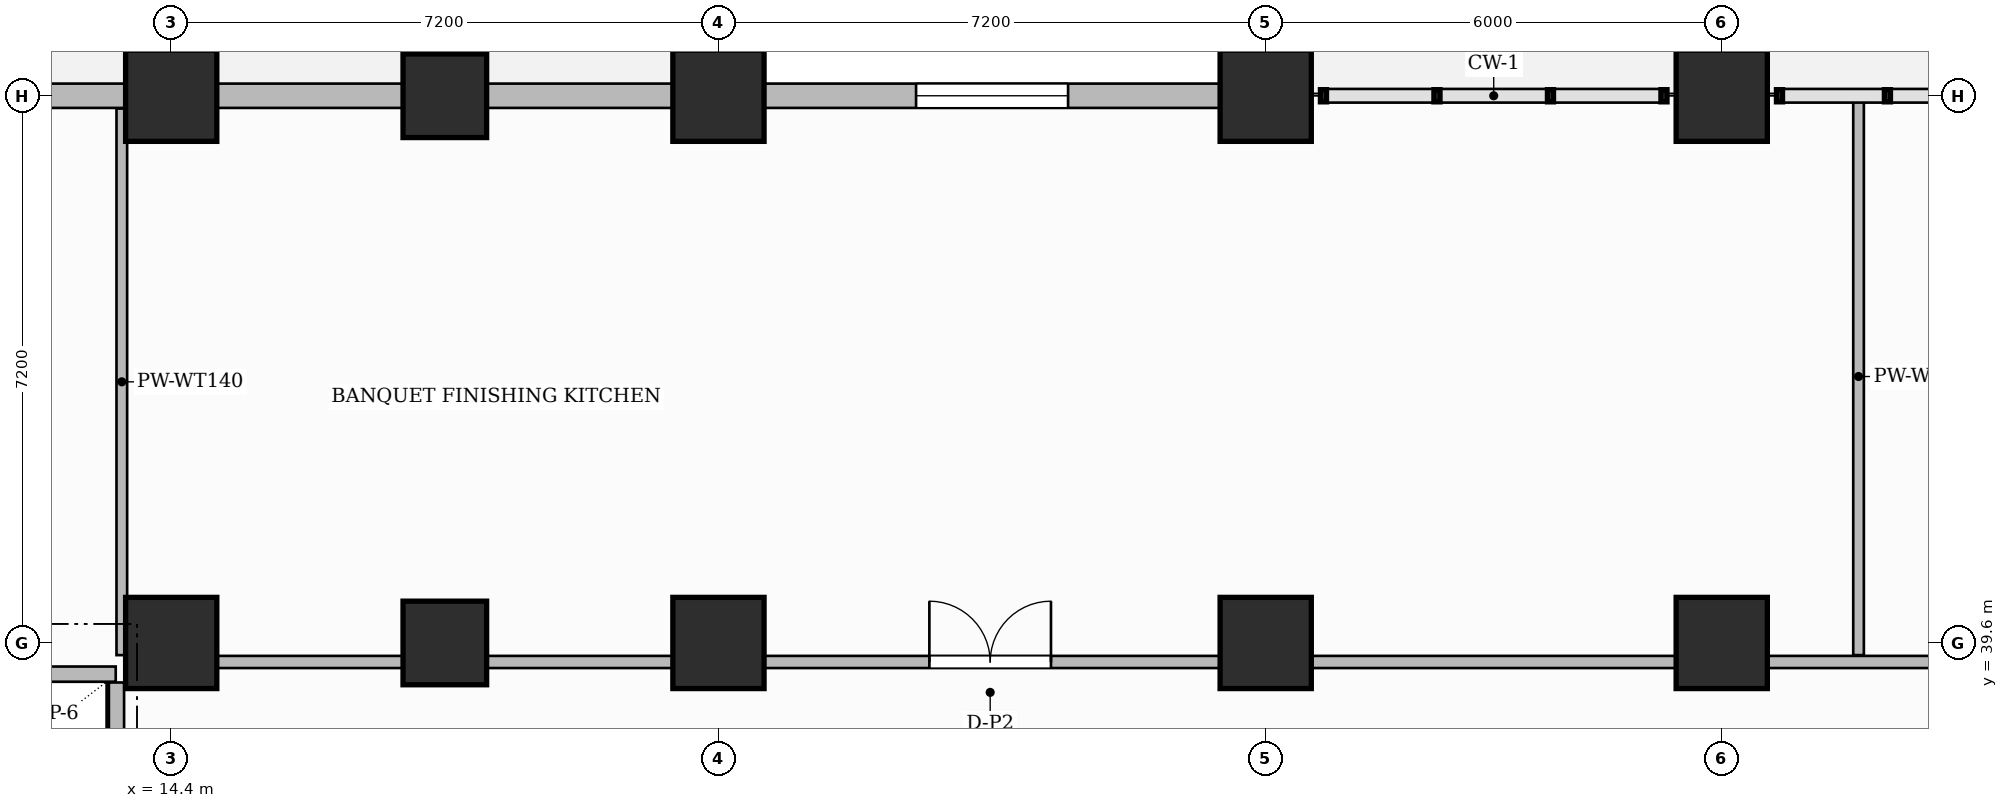
"""IFC4 building model, lengths in metres.
Left out: names, types, materials, properties, quantities, classifications, styles, units other than length and angle.
Written with IfcOpenShell. Run it as: python <this file> out.ifc"""

import sys

from ifc_helpers import new_model, si_unit, direction, frame, frame_2d, origin, origin_2d, place, context, subcontext, project, spatial, rectangle, extrude, source, transform, mapped, element, fill, save


model = new_model("IFC4")
c1 = context("Model", 3, precision=1e-05, world=origin(), true_north=direction((0.0, 1.0)))
c2 = subcontext(c1, "Body", "Model", "MODEL_VIEW")
j1 = project(units=[si_unit("LENGTHUNIT", "METRE"), si_unit("PLANEANGLEUNIT", "RADIAN")], contexts=[c1])
p1 = place(None, origin())
s1 = spatial("IfcSite", under=j1, at=p1, CompositionType="ELEMENT")
p2 = place(p1, origin())
s2 = spatial("IfcBuilding", under=s1, at=p2, CompositionType="ELEMENT")
p3 = place(p2, frame((0.0, 0.0, 16.2)))
s3 = spatial("IfcBuildingStorey", under=s2, at=p3, CompositionType="ELEMENT", Elevation=16.2)
m1 = source(origin(), c2, "Body", "SweptSolid", [
    extrude(rectangle(XDim=1.2, YDim=1.2, at=origin_2d()), origin(), (0.0, 0.0, 1.0), 5.4),
])
for number, where, z_axis, x_axis in (
    (1, (14.4, 39.6, 0.0), (0.0, 0.0, 1.0), (1.0, 0.0, 0.0)),
    (2, (14.4, 46.8, 0.0), (0.0, 0.0, 1.0), (1.0, 0.0, 0.0)),
    (3, (21.6, 39.6, 0.0), (0.0, 0.0, 1.0), (1.0, 0.0, 0.0)),
    (4, (21.6, 46.8, 0.0), (0.0, 0.0, 1.0), (1.0, 0.0, 0.0)),
    (5, (28.8, 39.6, 0.0), (0.0, 0.0, 1.0), (1.0, 0.0, 0.0)),
    (6, (28.8, 46.8, 0.0), (0.0, 0.0, 1.0), (1.0, 0.0, 0.0)),
    (7, (34.8, 39.6, 0.0), (0.0, 0.0, 1.0), (1.0, 0.0, 0.0)),
    (8, (34.8, 46.8, 0.0), (0.0, 0.0, 1.0), (1.0, 0.0, 0.0)),
):
    element("IfcColumn", number, at=place(p3, frame(where, z_axis=z_axis, x_axis=x_axis)), inside=s3, PredefinedType="COLUMN", context=c2, shape_type="MappedRepresentation", body=[
        mapped(m1, transform((0.0, 0.0, 0.0), scale=1.0)),
    ])
m2 = source(origin(), c2, "Body", "SweptSolid", [
    extrude(rectangle(XDim=1.1, YDim=1.1, at=origin_2d()), origin(), (0.0, 0.0, 1.0), 5.4),
])
for number, where, z_axis, x_axis in (
    (9, (18.0, 39.6, 0.0), (0.0, 0.0, 1.0), (1.0, 0.0, 0.0)),
    (10, (18.0, 46.8, 0.0), (0.0, 0.0, 1.0), (1.0, 0.0, 0.0)),
):
    element("IfcColumn", number, at=place(p3, frame(where, z_axis=z_axis, x_axis=x_axis)), inside=s3, PredefinedType="COLUMN", context=c2, shape_type="MappedRepresentation", body=[
        mapped(m2, transform((0.0, 0.0, 0.0), scale=1.0)),
    ])
p4 = place(p3, frame((11.71, 39.19, 0.0), z_axis=(0.0, 0.0, 1.0), x_axis=(1.0, 0.0, 0.0)))
e11 = element("IfcWall", 11, at=p4, inside=s3, PredefinedType="PARTITIONING", context=c2, shape_type="SweptSolid", body=[
    extrude(rectangle(XDim=1.96, YDim=0.2, at=frame_2d((0.98, 0.0))), origin(), (0.0, 0.0, 1.0), 5.1),
])
p5 = place(p3, frame((13.68, 34.36, 0.0), z_axis=(0.0, 0.0, 1.0), x_axis=(0.0, 1.0, 0.0)))
e12 = element("IfcWall", 12, at=p5, inside=s3, PredefinedType="PARTITIONING", context=c2, shape_type="SweptSolid", body=[
    extrude(rectangle(XDim=4.72, YDim=0.2, at=frame_2d((2.36, 0.0))), origin(), (0.0, 0.0, 1.0), 5.1),
])
p6 = place(p3, frame((13.75, 39.44, 0.0), z_axis=(0.0, 0.0, 1.0), x_axis=(0.0, 1.0, 0.0)))
e13 = element("IfcWall", 13, at=p6, inside=s3, PredefinedType="PARTITIONING", context=c2, shape_type="SweptSolid", body=[
    extrude(rectangle(XDim=7.192, YDim=0.14, at=frame_2d((3.596, 0.0))), origin(), (0.0, 0.0, 1.0), 5.1),
])
p7 = place(p3, frame((13.84, 39.35, 0.0), z_axis=(0.0, 0.0, 1.0), x_axis=(1.0, 0.0, 0.0)))
e14 = element("IfcWall", 14, at=p7, inside=s3, PredefinedType="PARTITIONING", context=c2, shape_type="SweptSolid", body=[
    extrude(rectangle(XDim=58.52, YDim=0.16, at=frame_2d((29.26, 0.0))), origin(), (0.0, 0.0, 1.0), 4.185),
])
p8 = place(p7, frame((10.535, 0.0, 0.0)))
e15 = element("IfcOpeningElement", 15, at=p8, cuts=e14, PredefinedType="OPENING", context=c2, shape_type="SweptSolid", body=[
    extrude(rectangle(XDim=1.6, YDim=2.4, at=frame_2d((0.8, 1.2))), frame((0.0, 0.09, 0.0), z_axis=(0.0, -1.0, 0.0), x_axis=(1.0, 0.0, 0.0)), (0.0, 0.0, 1.0), 0.18),
])
p9 = place(p7, frame((30.66, 0.0, 0.0)))
e16 = element("IfcOpeningElement", 16, at=p9, cuts=e14, PredefinedType="OPENING", context=c2, shape_type="SweptSolid", body=[
    extrude(rectangle(XDim=1.6, YDim=2.4, at=frame_2d((0.8, 1.2))), frame((0.0, 0.09, 0.0), z_axis=(0.0, -1.0, 0.0), x_axis=(1.0, 0.0, 0.0)), (0.0, 0.0, 1.0), 0.18),
])
p10 = place(p7, frame((44.235, 0.0, 0.0)))
e17 = element("IfcOpeningElement", 17, at=p10, cuts=e14, PredefinedType="OPENING", context=c2, shape_type="SweptSolid", body=[
    extrude(rectangle(XDim=0.85, YDim=2.1, at=frame_2d((0.425, 1.05))), frame((0.0, 0.09, 0.0), z_axis=(0.0, -1.0, 0.0), x_axis=(1.0, 0.0, 0.0)), (0.0, 0.0, 1.0), 0.18),
])
p11 = place(p7, frame((50.335, 0.0, 0.0)))
e18 = element("IfcOpeningElement", 18, at=p11, cuts=e14, PredefinedType="OPENING", context=c2, shape_type="SweptSolid", body=[
    extrude(rectangle(XDim=0.85, YDim=2.1, at=frame_2d((0.425, 1.05))), frame((0.0, 0.09, 0.0), z_axis=(0.0, -1.0, 0.0), x_axis=(1.0, 0.0, 0.0)), (0.0, 0.0, 1.0), 0.18),
])
p12 = place(p7, frame((54.685, 0.0, 0.0)))
e19 = element("IfcOpeningElement", 19, at=p12, cuts=e14, PredefinedType="OPENING", context=c2, shape_type="SweptSolid", body=[
    extrude(rectangle(XDim=1.6, YDim=2.4, at=frame_2d((0.8, 1.2))), frame((0.0, 0.09, 0.0), z_axis=(0.0, -1.0, 0.0), x_axis=(1.0, 0.0, 0.0)), (0.0, 0.0, 1.0), 0.18),
])
p13 = place(p3, frame((36.6, 39.44, 0.0), z_axis=(0.0, 0.0, 1.0), x_axis=(0.0, 1.0, 0.0)))
e20 = element("IfcWall", 20, at=p13, inside=s3, PredefinedType="PARTITIONING", context=c2, shape_type="SweptSolid", body=[
    extrude(rectangle(XDim=7.332, YDim=0.14, at=frame_2d((3.666, 0.0))), origin(), (0.0, 0.0, 1.0), 5.1),
])
p14 = place(p3, frame((-4.8, 46.8, 0.0), z_axis=(0.0, 0.0, 1.0), x_axis=(1.0, 0.0, 0.0)))
e21 = element("IfcWall", 21, at=p14, inside=s3, PredefinedType="SOLIDWALL", context=c2, shape_type="SweptSolid", body=[
    extrude(rectangle(XDim=33.6, YDim=0.32, at=frame_2d((16.8, 0.0))), origin(), (0.0, 0.0, 1.0), 4.185),
])
p15 = place(p14, frame((1.4, 0.0, 0.75)))
e22 = element("IfcOpeningElement", 22, at=p15, cuts=e21, PredefinedType="OPENING", context=c2, shape_type="SweptSolid", body=[
    extrude(rectangle(XDim=2.0, YDim=2.6, at=frame_2d((1.0, 1.3))), frame((0.0, 0.17, 0.0), z_axis=(0.0, -1.0, 0.0), x_axis=(1.0, 0.0, 0.0)), (0.0, 0.0, 1.0), 0.34),
])
p16 = place(p14, frame((7.4, 0.0, 0.75)))
e23 = element("IfcOpeningElement", 23, at=p16, cuts=e21, PredefinedType="OPENING", context=c2, shape_type="SweptSolid", body=[
    extrude(rectangle(XDim=2.0, YDim=2.6, at=frame_2d((1.0, 1.3))), frame((0.0, 0.17, 0.0), z_axis=(0.0, -1.0, 0.0), x_axis=(1.0, 0.0, 0.0)), (0.0, 0.0, 1.0), 0.34),
])
p17 = place(p14, frame((14.6, 0.0, 0.75)))
e24 = element("IfcOpeningElement", 24, at=p17, cuts=e21, PredefinedType="OPENING", context=c2, shape_type="SweptSolid", body=[
    extrude(rectangle(XDim=2.0, YDim=2.6, at=frame_2d((1.0, 1.3))), frame((0.0, 0.17, 0.0), z_axis=(0.0, -1.0, 0.0), x_axis=(1.0, 0.0, 0.0)), (0.0, 0.0, 1.0), 0.34),
])
p18 = place(p14, frame((29.0, 0.0, 0.75)))
e25 = element("IfcOpeningElement", 25, at=p18, cuts=e21, PredefinedType="OPENING", context=c2, shape_type="SweptSolid", body=[
    extrude(rectangle(XDim=2.0, YDim=2.6, at=frame_2d((1.0, 1.3))), frame((0.0, 0.17, 0.0), z_axis=(0.0, -1.0, 0.0), x_axis=(1.0, 0.0, 0.0)), (0.0, 0.0, 1.0), 0.34),
])
m3 = source(origin(), c2, "Body", "SweptSolid", [
    extrude(rectangle(XDim=1.6, YDim=2.4, at=frame_2d((0.8, 1.2))), frame((0.0, 0.025, 0.0), z_axis=(0.0, -1.0, 0.0), x_axis=(1.0, 0.0, 0.0)), (0.0, 0.0, 1.0), 0.05),
])
p19 = place(p8, origin())
e26 = element("IfcDoor", 26, at=p19, inside=s3, OperationType="DOUBLE_DOOR_SINGLE_SWING", PredefinedType="DOOR", context=c2, shape_type="MappedRepresentation", body=[
    mapped(m3, transform((0.0, 0.0, 0.0), scale=1.0)),
])
fill(e15, e26)
m4 = source(origin(), c2, "Body", "SweptSolid", [
    extrude(rectangle(XDim=2.0, YDim=2.6, at=frame_2d((1.0, 1.3))), frame((0.0, 0.03, 0.0), z_axis=(0.0, -1.0, 0.0), x_axis=(1.0, 0.0, 0.0)), (0.0, 0.0, 1.0), 0.06),
])
p20 = place(p18, origin())
e27 = element("IfcWindow", 27, at=p20, inside=s3, PartitioningType="DOUBLE_PANEL_VERTICAL", PredefinedType="WINDOW", context=c2, shape_type="MappedRepresentation", body=[
    mapped(m4, transform((0.0, 0.0, 0.0), scale=1.0)),
])
fill(e25, e27)
save(model, sys.argv[1])
